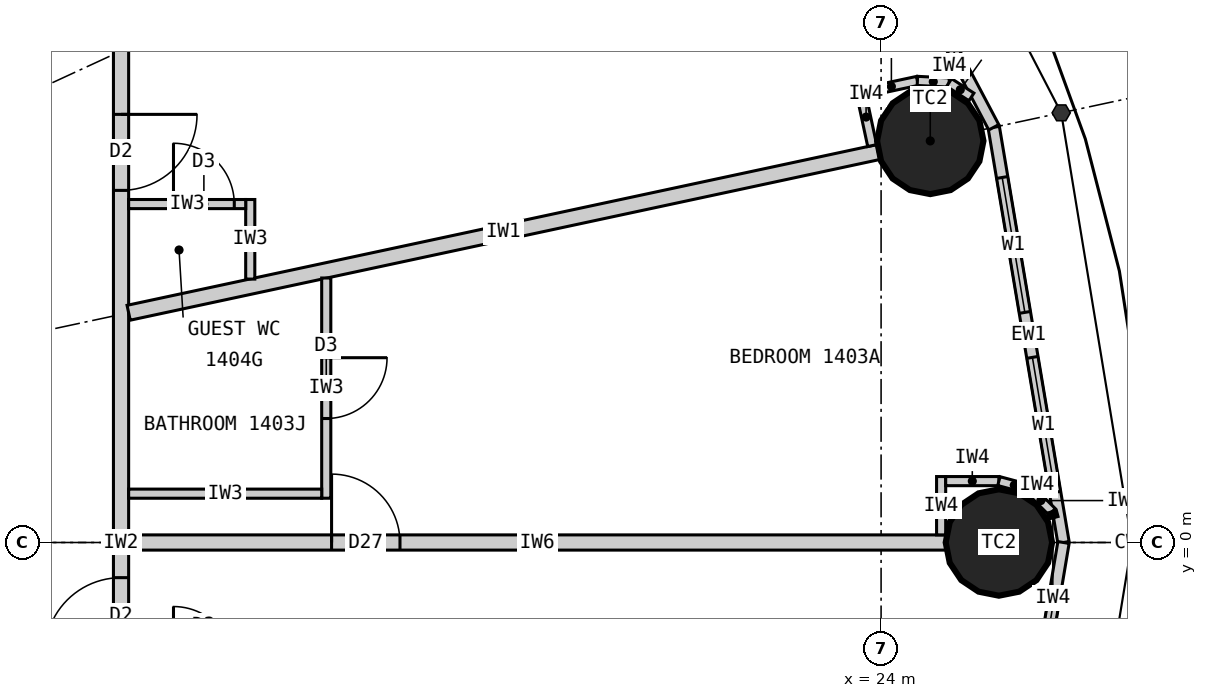
"""IFC4 building model, lengths in metres.
Left out: names, types, materials, properties, quantities, classifications, styles, units other than length and angle.
Written with IfcOpenShell. Run it as: python <this file> out.ifc"""

import sys

from ifc_helpers import new_model, si_unit, direction, frame, frame_2d, origin, origin_2d, place, context, subcontext, project, spatial, rectangle, circle, extrude, element, fill, save


model = new_model("IFC4")
c1 = context("Model", 3, precision=1e-05, world=origin(), true_north=direction((0.0, 1.0)))
c2 = subcontext(c1, "Body", "Model", "MODEL_VIEW")
j1 = project(units=[si_unit("LENGTHUNIT", "METRE"), si_unit("PLANEANGLEUNIT", "RADIAN")], contexts=[c1])
p1 = place(None, origin())
s1 = spatial("IfcSite", under=j1, at=p1, CompositionType="ELEMENT")
p2 = place(p1, origin())
s2 = spatial("IfcBuilding", under=s1, at=p2, CompositionType="ELEMENT")
p3 = place(p2, frame((0.0, 0.0, 60.6)))
s3 = spatial("IfcBuildingStorey", under=s2, at=p3, CompositionType="ELEMENT", Elevation=60.6)
for number, where, z_axis, x_axis in (
    (1, (25.55, 0.0, 0.0), (0.0, 0.0, 1.0), (1.0, 0.0, 0.0)),
    (2, (24.647, 5.283, 0.0), (0.0, 0.0, 1.0), (1.0, 0.0, 0.0)),
):
    element("IfcColumn", number, at=place(p3, frame(where, z_axis=z_axis, x_axis=x_axis)), inside=s3, PredefinedType="COLUMN", context=c2, shape_type="SweptSolid", body=[
        extrude(circle(Radius=0.7, at=origin_2d()), origin(), (0.0, 0.0, 1.0), 3.3),
    ])
p4 = place(p3, frame((26.4, 0.0, 0.0), z_axis=(0.0, 0.0, 1.0), x_axis=(-0.165642551694, 0.986185857264, 0.0)))
e3 = element("IfcWall", 3, at=p4, inside=s3, PredefinedType="ELEMENTEDWALL", context=c2, shape_type="SweptSolid", body=[
    extrude(rectangle(XDim=5.539, YDim=0.15, at=frame_2d((2.77, 0.0))), origin(), (0.0, 0.0, 1.0), 3.12),
])
p5 = place(p4, frame((0.669, 0.0, 0.9)))
e4 = element("IfcOpeningElement", 4, at=p5, cuts=e3, PredefinedType="OPENING", context=c2, shape_type="SweptSolid", body=[
    extrude(rectangle(XDim=1.8, YDim=1.9, at=frame_2d((0.9, 0.95))), frame((0.0, 0.085, 0.0), z_axis=(0.0, -1.0, 0.0), x_axis=(1.0, 0.0, 0.0)), (0.0, 0.0, 1.0), 0.17),
])
p6 = place(p4, frame((3.07, 0.0, 0.9)))
e5 = element("IfcOpeningElement", 5, at=p6, cuts=e3, PredefinedType="OPENING", context=c2, shape_type="SweptSolid", body=[
    extrude(rectangle(XDim=1.8, YDim=1.9, at=frame_2d((0.9, 0.95))), frame((0.0, 0.085, 0.0), z_axis=(0.0, -1.0, 0.0), x_axis=(1.0, 0.0, 0.0)), (0.0, 0.0, 1.0), 0.17),
])
p7 = place(p3, frame((25.482, 5.462, 0.0), z_axis=(0.0, 0.0, 1.0), x_axis=(-0.467296867008, 0.884100468321, 0.0)))
e6 = element("IfcWall", 6, at=p7, inside=s3, PredefinedType="ELEMENTEDWALL", context=c2, shape_type="SweptSolid", body=[
    extrude(rectangle(XDim=5.734, YDim=0.15, at=frame_2d((2.867, 0.0))), origin(), (0.0, 0.0, 1.0), 3.12),
])
p8 = place(p7, frame((0.767, 0.0, 0.9)))
e7 = element("IfcOpeningElement", 7, at=p8, cuts=e6, PredefinedType="OPENING", context=c2, shape_type="SweptSolid", body=[
    extrude(rectangle(XDim=1.8, YDim=1.9, at=frame_2d((0.9, 0.95))), frame((0.0, 0.085, 0.0), z_axis=(0.0, -1.0, 0.0), x_axis=(1.0, 0.0, 0.0)), (0.0, 0.0, 1.0), 0.17),
])
p9 = place(p7, frame((3.167, 0.0, 0.9)))
e8 = element("IfcOpeningElement", 8, at=p9, cuts=e6, PredefinedType="OPENING", context=c2, shape_type="SweptSolid", body=[
    extrude(rectangle(XDim=1.8, YDim=1.9, at=frame_2d((0.9, 0.95))), frame((0.0, 0.085, 0.0), z_axis=(0.0, -1.0, 0.0), x_axis=(1.0, 0.0, 0.0)), (0.0, 0.0, 1.0), 0.17),
])
p10 = place(p3, frame((25.482, -5.462, 0.0), z_axis=(0.0, 0.0, 1.0), x_axis=(0.165642551694, 0.986185857264, 0.0)))
e9 = element("IfcWall", 9, at=p10, inside=s3, PredefinedType="ELEMENTEDWALL", context=c2, shape_type="SweptSolid", body=[
    extrude(rectangle(XDim=5.539, YDim=0.15, at=frame_2d((2.77, 0.0))), origin(), (0.0, 0.0, 1.0), 3.12),
])
p11 = place(p10, frame((0.669, 0.0, 0.9)))
e10 = element("IfcOpeningElement", 10, at=p11, cuts=e9, PredefinedType="OPENING", context=c2, shape_type="SweptSolid", body=[
    extrude(rectangle(XDim=1.8, YDim=1.9, at=frame_2d((0.9, 0.95))), frame((0.0, 0.085, 0.0), z_axis=(0.0, -1.0, 0.0), x_axis=(1.0, 0.0, 0.0)), (0.0, 0.0, 1.0), 0.17),
])
p12 = place(p10, frame((3.07, 0.0, 0.9)))
e11 = element("IfcOpeningElement", 11, at=p12, cuts=e9, PredefinedType="OPENING", context=c2, shape_type="SweptSolid", body=[
    extrude(rectangle(XDim=1.8, YDim=1.9, at=frame_2d((0.9, 0.95))), frame((0.0, 0.085, 0.0), z_axis=(0.0, -1.0, 0.0), x_axis=(1.0, 0.0, 0.0)), (0.0, 0.0, 1.0), 0.17),
])
p13 = place(p3, frame((14.0, -9.9, 0.0), z_axis=(0.0, 0.0, 1.0), x_axis=(0.0, 1.0, 0.0)))
e12 = element("IfcWall", 12, at=p13, inside=s3, PredefinedType="PARTITIONING", context=c2, shape_type="SweptSolid", body=[
    extrude(rectangle(XDim=19.8, YDim=0.2, at=frame_2d((9.9, 0.0))), origin(), (0.0, 0.0, 1.0), 3.12),
])
p14 = place(p13, frame((0.103, 0.0, 0.0)))
e13 = element("IfcOpeningElement", 13, at=p14, cuts=e12, PredefinedType="OPENING", context=c2, shape_type="SweptSolid", body=[
    extrude(rectangle(XDim=1.0, YDim=2.2, at=frame_2d((0.5, 1.1))), frame((0.0, 0.11, 0.0), z_axis=(0.0, -1.0, 0.0), x_axis=(1.0, 0.0, 0.0)), (0.0, 0.0, 1.0), 0.22),
])
p15 = place(p13, frame((5.248, 0.0, 0.0)))
e14 = element("IfcOpeningElement", 14, at=p15, cuts=e12, PredefinedType="OPENING", context=c2, shape_type="SweptSolid", body=[
    extrude(rectangle(XDim=1.0, YDim=2.2, at=frame_2d((0.5, 1.1))), frame((0.0, 0.11, 0.0), z_axis=(0.0, -1.0, 0.0), x_axis=(1.0, 0.0, 0.0)), (0.0, 0.0, 1.0), 0.22),
])
p16 = place(p13, frame((8.438, 0.0, 0.0)))
e15 = element("IfcOpeningElement", 15, at=p16, cuts=e12, PredefinedType="OPENING", context=c2, shape_type="SweptSolid", body=[
    extrude(rectangle(XDim=1.0, YDim=2.2, at=frame_2d((0.5, 1.1))), frame((0.0, 0.11, 0.0), z_axis=(0.0, -1.0, 0.0), x_axis=(1.0, 0.0, 0.0)), (0.0, 0.0, 1.0), 0.22),
])
p17 = place(p13, frame((14.532, 0.0, 0.0)))
e16 = element("IfcOpeningElement", 16, at=p17, cuts=e12, PredefinedType="OPENING", context=c2, shape_type="SweptSolid", body=[
    extrude(rectangle(XDim=1.0, YDim=2.2, at=frame_2d((0.5, 1.1))), frame((0.0, 0.11, 0.0), z_axis=(0.0, -1.0, 0.0), x_axis=(1.0, 0.0, 0.0)), (0.0, 0.0, 1.0), 0.22),
])
p18 = place(p3, frame((14.1, 0.0, 0.0), z_axis=(0.0, 0.0, 1.0), x_axis=(1.0, 0.0, 0.0)))
e17 = element("IfcWall", 17, at=p18, inside=s3, PredefinedType="PARTITIONING", context=c2, shape_type="SweptSolid", body=[
    extrude(rectangle(XDim=10.75, YDim=0.2, at=frame_2d((5.375, 0.0))), origin(), (0.0, 0.0, 1.0), 2.27),
])
p19 = place(p18, frame((2.67, 0.0, 0.0)))
e18 = element("IfcOpeningElement", 18, at=p19, cuts=e17, PredefinedType="OPENING", context=c2, shape_type="SweptSolid", body=[
    extrude(rectangle(XDim=0.9, YDim=2.1, at=frame_2d((0.45, 1.05))), frame((0.0, 0.11, 0.0), z_axis=(0.0, -1.0, 0.0), x_axis=(1.0, 0.0, 0.0)), (0.0, 0.0, 1.0), 0.22),
])
p20 = place(p3, frame((14.1, 3.022, 0.0), z_axis=(0.0, 0.0, 1.0), x_axis=(0.977790014929, 0.209586943072, 0.0)))
e19 = element("IfcWall", 19, at=p20, inside=s3, PredefinedType="PARTITIONING", context=c2, shape_type="SweptSolid", body=[
    extrude(rectangle(XDim=10.087, YDim=0.2, at=frame_2d((5.043, 0.0))), origin(), (0.0, 0.0, 1.0), 2.32),
])
p21 = place(p3, frame((16.7, 3.48, 0.0), z_axis=(0.0, 0.0, 1.0), x_axis=(0.0, -1.0, 0.0)))
e20 = element("IfcWall", 20, at=p21, inside=s3, PredefinedType="PARTITIONING", context=c2, shape_type="SweptSolid", body=[
    extrude(rectangle(XDim=2.897, YDim=0.12, at=frame_2d((1.449, 0.0))), origin(), (0.0, 0.0, 1.0), 3.12),
])
p22 = place(p21, frame((1.049, 0.0, 0.0)))
e21 = element("IfcOpeningElement", 21, at=p22, cuts=e20, PredefinedType="OPENING", context=c2, shape_type="SweptSolid", body=[
    extrude(rectangle(XDim=0.8, YDim=2.1, at=frame_2d((0.4, 1.05))), frame((0.0, 0.07, 0.0), z_axis=(0.0, -1.0, 0.0), x_axis=(1.0, 0.0, 0.0)), (0.0, 0.0, 1.0), 0.14),
])
p23 = place(p3, frame((14.1, 0.643, 0.0), z_axis=(0.0, 0.0, 1.0), x_axis=(1.0, 0.0, 0.0)))
e22 = element("IfcWall", 22, at=p23, inside=s3, PredefinedType="PARTITIONING", context=c2, shape_type="SweptSolid", body=[
    extrude(rectangle(XDim=2.54, YDim=0.12, at=frame_2d((1.27, 0.0))), origin(), (0.0, 0.0, 1.0), 3.12),
])
p24 = place(p3, frame((15.7, 3.465, 0.0), z_axis=(0.0, 0.0, 1.0), x_axis=(0.0, 1.0, 0.0)))
e23 = element("IfcWall", 23, at=p24, inside=s3, PredefinedType="PARTITIONING", context=c2, shape_type="SweptSolid", body=[
    extrude(rectangle(XDim=1.047, YDim=0.12, at=frame_2d((0.523, 0.0))), origin(), (0.0, 0.0, 1.0), 3.12),
])
p25 = place(p3, frame((14.1, 4.452, 0.0), z_axis=(0.0, 0.0, 1.0), x_axis=(1.0, 0.0, 0.0)))
e24 = element("IfcWall", 24, at=p25, inside=s3, PredefinedType="PARTITIONING", context=c2, shape_type="SweptSolid", body=[
    extrude(rectangle(XDim=1.54, YDim=0.12, at=frame_2d((0.77, 0.0))), origin(), (0.0, 0.0, 1.0), 3.12),
])
p26 = place(p25, frame((0.59, 0.0, 0.0)))
e25 = element("IfcOpeningElement", 25, at=p26, cuts=e24, PredefinedType="OPENING", context=c2, shape_type="SweptSolid", body=[
    extrude(rectangle(XDim=0.8, YDim=2.1, at=frame_2d((0.4, 1.05))), frame((0.0, 0.07, 0.0), z_axis=(0.0, -1.0, 0.0), x_axis=(1.0, 0.0, 0.0)), (0.0, 0.0, 1.0), 0.14),
])
p27 = place(p3, frame((24.79, 0.1, 0.0), z_axis=(0.0, 0.0, 1.0), x_axis=(0.0, 1.0, 0.0)))
e26 = element("IfcWall", 26, at=p27, inside=s3, PredefinedType="PARTITIONING", context=c2, shape_type="SweptSolid", body=[
    extrude(rectangle(XDim=0.767, YDim=0.12, at=frame_2d((0.384, 0.0))), origin(), (0.0, 0.0, 1.0), 3.12),
])
p28 = place(p3, frame((24.85, 0.808, 0.0), z_axis=(0.0, 0.0, 1.0), x_axis=(1.0, 0.0, 0.0)))
e27 = element("IfcWall", 27, at=p28, inside=s3, PredefinedType="PARTITIONING", context=c2, shape_type="SweptSolid", body=[
    extrude(rectangle(XDim=0.7, YDim=0.12, at=frame_2d((0.35, 0.0))), origin(), (0.0, 0.0, 1.0), 3.12),
])
p29 = place(p3, frame((25.55, 0.808, 0.0), z_axis=(0.0, 0.0, 1.0), x_axis=(0.965807183573, -0.2592614205, 0.0)))
e28 = element("IfcWall", 28, at=p29, inside=s3, PredefinedType="PARTITIONING", context=c2, shape_type="SweptSolid", body=[
    extrude(rectangle(XDim=0.418, YDim=0.12, at=frame_2d((0.209, 0.0))), origin(), (0.0, 0.0, 1.0), 3.12),
])
p30 = place(p3, frame((25.954, 0.699, 0.0), z_axis=(0.0, 0.0, 1.0), x_axis=(0.707106781187, -0.707106781187, 0.0)))
e29 = element("IfcWall", 29, at=p30, inside=s3, PredefinedType="PARTITIONING", context=c2, shape_type="SweptSolid", body=[
    extrude(rectangle(XDim=0.418, YDim=0.12, at=frame_2d((0.209, 0.0))), origin(), (0.0, 0.0, 1.0), 3.12),
])
p31 = place(p3, frame((26.249, 0.404, 0.0), z_axis=(0.0, 0.0, 1.0), x_axis=(0.259754282609, -0.965674744759, 0.0)))
e30 = element("IfcWall", 30, at=p31, inside=s3, PredefinedType="PARTITIONING", context=c2, shape_type="SweptSolid", body=[
    extrude(rectangle(XDim=0.08, YDim=0.12, at=frame_2d((0.04, 0.0))), origin(), (0.0, 0.0, 1.0), 3.12),
])
p32 = place(p3, frame((23.883, 5.222, 0.0), z_axis=(0.0, 0.0, 1.0), x_axis=(-0.209311842415, 0.977848941619, 0.0)))
e31 = element("IfcWall", 31, at=p32, inside=s3, PredefinedType="PARTITIONING", context=c2, shape_type="SweptSolid", body=[
    extrude(rectangle(XDim=0.768, YDim=0.12, at=frame_2d((0.384, 0.0))), origin(), (0.0, 0.0, 1.0), 3.12),
])
p33 = place(p3, frame((23.793, 5.926, 0.0), z_axis=(0.0, 0.0, 1.0), x_axis=(0.977792206673, 0.209576717621, 0.0)))
e32 = element("IfcWall", 32, at=p33, inside=s3, PredefinedType="PARTITIONING", context=c2, shape_type="SweptSolid", body=[
    extrude(rectangle(XDim=0.7, YDim=0.12, at=frame_2d((0.35, 0.0))), origin(), (0.0, 0.0, 1.0), 3.12),
])
p34 = place(p3, frame((24.478, 6.073, 0.0), z_axis=(0.0, 0.0, 1.0), x_axis=(0.998708262812, -0.05081147302, 0.0)))
e33 = element("IfcWall", 33, at=p34, inside=s3, PredefinedType="PARTITIONING", context=c2, shape_type="SweptSolid", body=[
    extrude(rectangle(XDim=0.418, YDim=0.12, at=frame_2d((0.209, 0.0))), origin(), (0.0, 0.0, 1.0), 3.12),
])
p35 = place(p3, frame((24.895, 6.052, 0.0), z_axis=(0.0, 0.0, 1.0), x_axis=(0.839495197275, -0.54336710772, 0.0)))
e34 = element("IfcWall", 34, at=p35, inside=s3, PredefinedType="PARTITIONING", context=c2, shape_type="SweptSolid", body=[
    extrude(rectangle(XDim=0.35, YDim=0.12, at=frame_2d((0.175, 0.0))), origin(), (0.0, 0.0, 1.0), 3.12),
])
p36 = place(p5, origin())
e35 = element("IfcWindow", 35, at=p36, inside=s3, PartitioningType="SINGLE_PANEL", PredefinedType="WINDOW", context=c2, shape_type="SweptSolid", body=[
    extrude(rectangle(XDim=1.8, YDim=1.9, at=frame_2d((0.9, 0.95))), frame((0.0, 0.03, 0.0), z_axis=(0.0, -1.0, 0.0), x_axis=(1.0, 0.0, 0.0)), (0.0, 0.0, 1.0), 0.06),
])
fill(e4, e35)
p37 = place(p6, origin())
e36 = element("IfcWindow", 36, at=p37, inside=s3, PartitioningType="SINGLE_PANEL", PredefinedType="WINDOW", context=c2, shape_type="SweptSolid", body=[
    extrude(rectangle(XDim=1.8, YDim=1.9, at=frame_2d((0.9, 0.95))), frame((0.0, 0.03, 0.0), z_axis=(0.0, -1.0, 0.0), x_axis=(1.0, 0.0, 0.0)), (0.0, 0.0, 1.0), 0.06),
])
fill(e5, e36)
p38 = place(p8, origin())
e37 = element("IfcWindow", 37, at=p38, inside=s3, PartitioningType="SINGLE_PANEL", PredefinedType="WINDOW", context=c2, shape_type="SweptSolid", body=[
    extrude(rectangle(XDim=1.8, YDim=1.9, at=frame_2d((0.9, 0.95))), frame((0.0, 0.03, 0.0), z_axis=(0.0, -1.0, 0.0), x_axis=(1.0, 0.0, 0.0)), (0.0, 0.0, 1.0), 0.06),
])
fill(e7, e37)
p39 = place(p12, origin())
e38 = element("IfcWindow", 38, at=p39, inside=s3, PartitioningType="SINGLE_PANEL", PredefinedType="WINDOW", context=c2, shape_type="SweptSolid", body=[
    extrude(rectangle(XDim=1.8, YDim=1.9, at=frame_2d((0.9, 0.95))), frame((0.0, 0.03, 0.0), z_axis=(0.0, -1.0, 0.0), x_axis=(1.0, 0.0, 0.0)), (0.0, 0.0, 1.0), 0.06),
])
fill(e11, e38)
p40 = place(p16, origin())
e39 = element("IfcDoor", 39, at=p40, inside=s3, OperationType="SINGLE_SWING_LEFT", PredefinedType="DOOR", context=c2, shape_type="SweptSolid", body=[
    extrude(rectangle(XDim=1.0, YDim=2.2, at=frame_2d((0.5, 1.1))), frame((0.0, 0.025, 0.0), z_axis=(0.0, -1.0, 0.0), x_axis=(1.0, 0.0, 0.0)), (0.0, 0.0, 1.0), 0.05),
])
fill(e15, e39)
p41 = place(p22, origin())
e40 = element("IfcDoor", 40, at=p41, inside=s3, OperationType="SINGLE_SWING_LEFT", PredefinedType="DOOR", context=c2, shape_type="SweptSolid", body=[
    extrude(rectangle(XDim=0.8, YDim=2.1, at=frame_2d((0.4, 1.05))), frame((0.0, 0.025, 0.0), z_axis=(0.0, -1.0, 0.0), x_axis=(1.0, 0.0, 0.0)), (0.0, 0.0, 1.0), 0.05),
])
fill(e21, e40)
p42 = place(p19, origin())
e41 = element("IfcDoor", 41, at=p42, inside=s3, OperationType="SINGLE_SWING_LEFT", PredefinedType="DOOR", context=c2, shape_type="SweptSolid", body=[
    extrude(rectangle(XDim=0.9, YDim=2.1, at=frame_2d((0.45, 1.05))), frame((0.0, 0.025, 0.0), z_axis=(0.0, -1.0, 0.0), x_axis=(1.0, 0.0, 0.0)), (0.0, 0.0, 1.0), 0.05),
])
fill(e18, e41)
p43 = place(p26, origin())
e42 = element("IfcDoor", 42, at=p43, inside=s3, OperationType="SINGLE_SWING_LEFT", PredefinedType="DOOR", context=c2, shape_type="SweptSolid", body=[
    extrude(rectangle(XDim=0.8, YDim=2.1, at=frame_2d((0.4, 1.05))), frame((0.0, 0.025, 0.0), z_axis=(0.0, -1.0, 0.0), x_axis=(1.0, 0.0, 0.0)), (0.0, 0.0, 1.0), 0.05),
])
fill(e25, e42)
p44 = place(p17, origin())
e43 = element("IfcDoor", 43, at=p44, inside=s3, OperationType="SINGLE_SWING_RIGHT", PredefinedType="DOOR", context=c2, shape_type="SweptSolid", body=[
    extrude(rectangle(XDim=1.0, YDim=2.2, at=frame_2d((0.5, 1.1))), frame((0.0, 0.025, 0.0), z_axis=(0.0, -1.0, 0.0), x_axis=(1.0, 0.0, 0.0)), (0.0, 0.0, 1.0), 0.05),
])
fill(e16, e43)
save(model, sys.argv[1])
